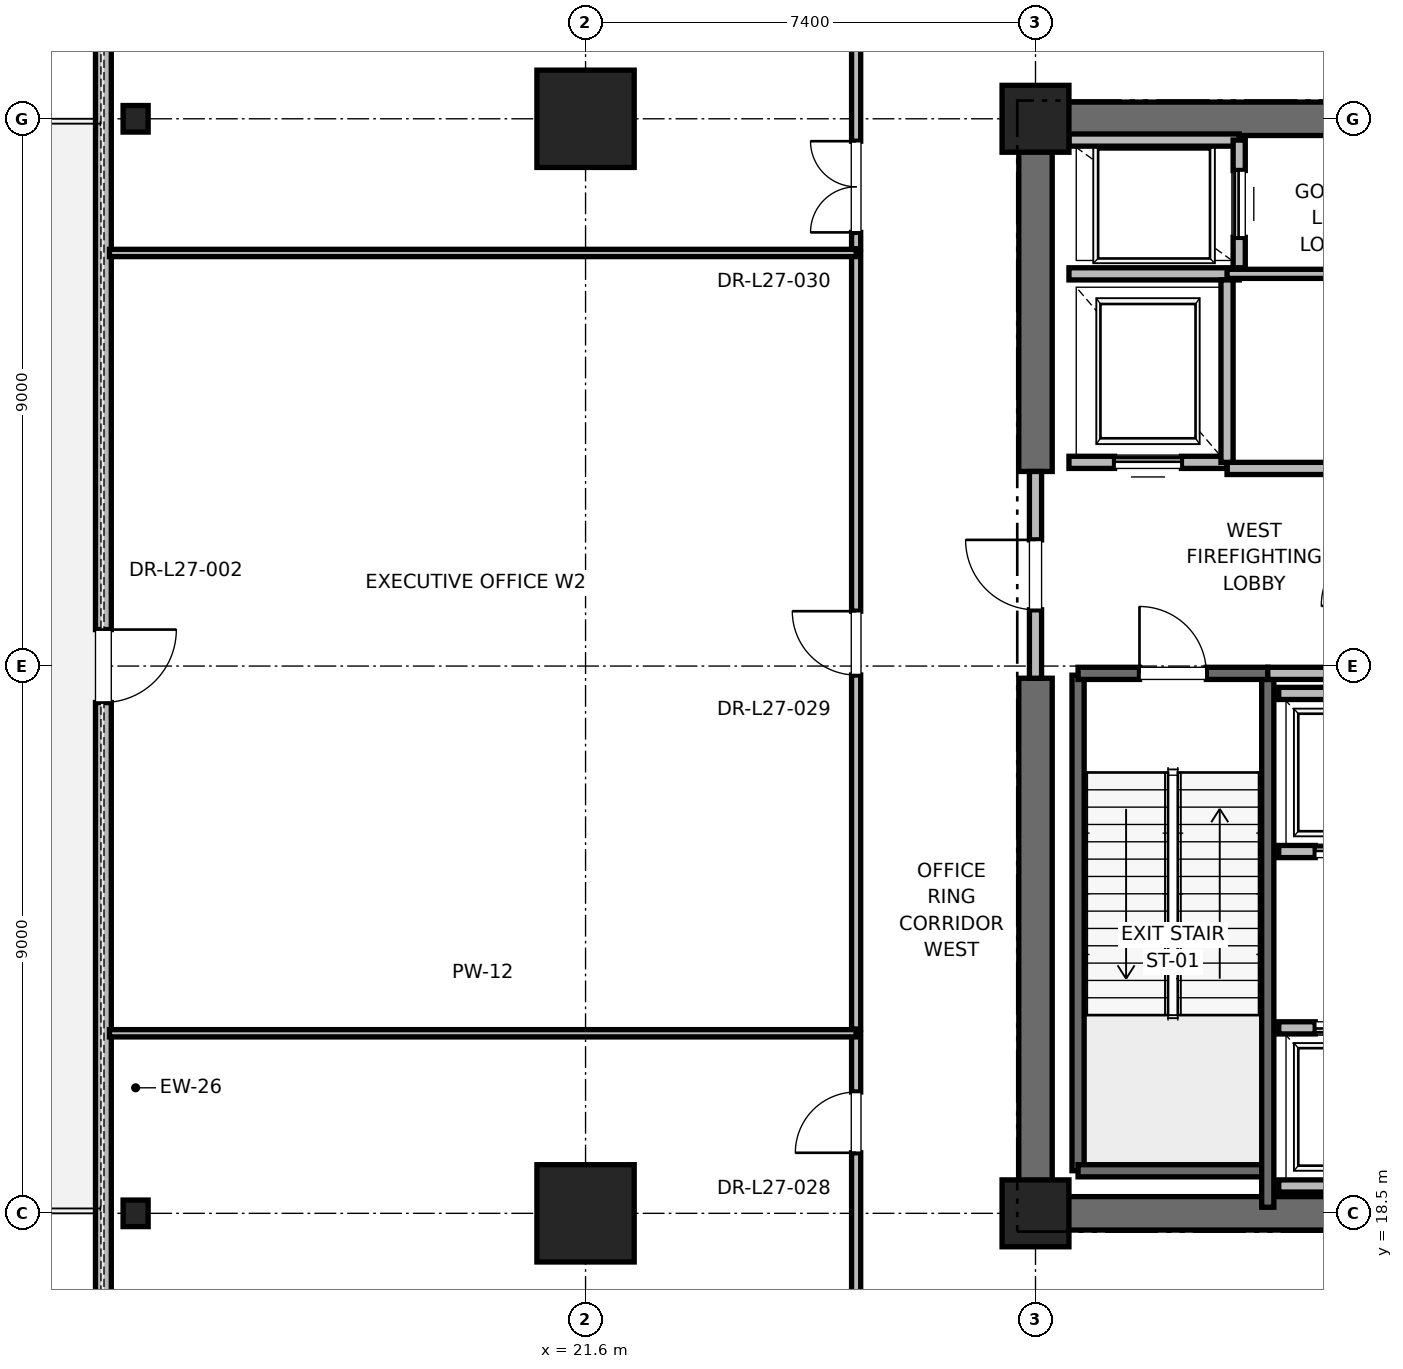
"""IFC4 building model, lengths in metres.
Left out: names, types, materials, properties, quantities, classifications, styles, units other than length and angle.
Written with IfcOpenShell. Run it as: python <this file> out.ifc"""

import sys

from ifc_helpers import new_model, si_unit, direction, frame, frame_2d, origin, origin_2d, place, context, subcontext, project, spatial, rectangle, i_section, extrude, element, fill, save


model = new_model("IFC4")
c1 = context("Model", 3, precision=1e-05, world=origin(), true_north=direction((0.0, 1.0)))
c2 = subcontext(c1, "Body", "Model", "MODEL_VIEW")
j1 = project(units=[si_unit("LENGTHUNIT", "METRE"), si_unit("PLANEANGLEUNIT", "RADIAN")], contexts=[c1])
p1 = place(None, origin())
s1 = spatial("IfcSite", under=j1, at=p1, CompositionType="ELEMENT")
p2 = place(p1, origin())
s2 = spatial("IfcBuilding", under=s1, at=p2, CompositionType="ELEMENT")
p3 = place(p2, frame((0.0, 0.0, 118.4)))
s3 = spatial("IfcBuildingStorey", under=s2, at=p3, CompositionType="ELEMENT", Elevation=118.4)
for number, where, z_axis, x_axis in (
    (1, (21.6, 18.5, 0.0), (0.0, 0.0, 1.0), (1.0, 0.0, 0.0)),
    (2, (21.6, 36.5, 0.0), (0.0, 0.0, 1.0), (1.0, 0.0, 0.0)),
):
    element("IfcColumn", number, at=place(p3, frame(where, z_axis=z_axis, x_axis=x_axis)), inside=s3, PredefinedType="COLUMN", context=c2, shape_type="SweptSolid", body=[
        extrude(rectangle(XDim=1.6, YDim=1.6, at=origin_2d()), origin(), (0.0, 0.0, 1.0), 5.0),
    ])
for number, where, z_axis, x_axis in (
    (3, (14.2, 18.5, 0.0), (0.0, 0.0, 1.0), (1.0, 0.0, 0.0)),
    (4, (14.2, 36.5, 0.0), (0.0, 0.0, 1.0), (1.0, 0.0, 0.0)),
):
    element("IfcColumn", number, at=place(p3, frame(where, z_axis=z_axis, x_axis=x_axis)), inside=s3, PredefinedType="COLUMN", context=c2, shape_type="SweptSolid", body=[
        extrude(i_section(OverallWidth=0.412, OverallDepth=0.437, WebThickness=0.036, FlangeThickness=0.058, FilletRadius=0.015, at=origin_2d()), origin(), (0.0, 0.0, 1.0), 5.0),
    ])
for number, where, z_axis, x_axis in (
    (5, (29.0, 18.5, 0.0), (0.0, 0.0, 1.0), (1.0, 0.0, 0.0)),
    (6, (29.0, 36.5, 0.0), (0.0, 0.0, 1.0), (1.0, 0.0, 0.0)),
):
    element("IfcColumn", number, at=place(p3, frame(where, z_axis=z_axis, x_axis=x_axis)), inside=s3, PredefinedType="PILASTER", context=c2, shape_type="SweptSolid", body=[
        extrude(rectangle(XDim=1.1, YDim=1.1, at=origin_2d()), origin(), (0.0, 0.0, 1.0), 5.0),
    ])
p4 = place(p3, frame((29.0, 18.5, 0.0), z_axis=(0.0, 0.0, 1.0), x_axis=(1.0, 0.0, 0.0)))
e7 = element("IfcWall", 7, at=p4, inside=s3, PredefinedType="SHEAR", context=c2, shape_type="SweptSolid", body=[
    extrude(rectangle(XDim=9.2, YDim=0.55, at=frame_2d((4.6, 0.0))), origin(), (0.0, 0.0, 1.0), 4.7),
])
p5 = place(p3, frame((29.0, 36.5, 0.0), z_axis=(0.0, 0.0, 1.0), x_axis=(1.0, 0.0, 0.0)))
e8 = element("IfcWall", 8, at=p5, inside=s3, PredefinedType="SHEAR", context=c2, shape_type="SweptSolid", body=[
    extrude(rectangle(XDim=5.8, YDim=0.55, at=frame_2d((2.9, 0.0))), origin(), (0.0, 0.0, 1.0), 4.7),
])
p6 = place(p3, frame((29.0, 18.5, 0.0), z_axis=(0.0, 0.0, 1.0), x_axis=(0.0, 1.0, 0.0)))
e9 = element("IfcWall", 9, at=p6, inside=s3, PredefinedType="SHEAR", context=c2, shape_type="SweptSolid", body=[
    extrude(rectangle(XDim=8.8, YDim=0.55, at=frame_2d((4.4, 0.0))), origin(), (0.0, 0.0, 1.0), 4.7),
])
p7 = place(p3, frame((29.0, 30.7, 0.0), z_axis=(0.0, 0.0, 1.0), x_axis=(0.0, 1.0, 0.0)))
e10 = element("IfcWall", 10, at=p7, inside=s3, PredefinedType="SHEAR", context=c2, shape_type="SweptSolid", body=[
    extrude(rectangle(XDim=5.8, YDim=0.55, at=frame_2d((2.9, 0.0))), origin(), (0.0, 0.0, 1.0), 4.7),
])
p8 = place(p3, frame((13.67, 46.771, 0.0), z_axis=(0.0, 0.0, 1.0), x_axis=(0.0, -1.0, 0.0)))
e11 = element("IfcWall", 11, at=p8, inside=s3, PredefinedType="PARAPET", context=c2, shape_type="SweptSolid", body=[
    extrude(rectangle(XDim=38.542, YDim=0.26, at=frame_2d((19.271, 0.0))), origin(), (0.0, 0.0, 1.0), 3.91),
])
p9 = place(p8, frame((4.2, 0.0, 0.85)))
e12 = element("IfcOpeningElement", 12, at=p9, cuts=e11, PredefinedType="OPENING", context=c2, shape_type="SweptSolid", body=[
    extrude(rectangle(XDim=1.8, YDim=2.2, at=frame_2d((0.9, 1.1))), frame((0.0, 0.13, 0.0), z_axis=(0.0, -1.0, 0.0), x_axis=(1.0, 0.0, 0.0)), (0.0, 0.0, 1.0), 0.26),
])
p10 = place(p8, frame((18.671, 0.0, 0.0)))
e13 = element("IfcOpeningElement", 13, at=p10, cuts=e11, PredefinedType="OPENING", context=c2, shape_type="SweptSolid", body=[
    extrude(rectangle(XDim=1.2, YDim=2.2, at=frame_2d((0.6, 1.1))), frame((0.0, 0.13, 0.0), z_axis=(0.0, -1.0, 0.0), x_axis=(1.0, 0.0, 0.0)), (0.0, 0.0, 1.0), 0.26),
])
p11 = place(p8, frame((32.542, 0.0, 0.85)))
e14 = element("IfcOpeningElement", 14, at=p11, cuts=e11, PredefinedType="OPENING", context=c2, shape_type="SweptSolid", body=[
    extrude(rectangle(XDim=1.8, YDim=2.2, at=frame_2d((0.9, 1.1))), frame((0.0, 0.13, 0.0), z_axis=(0.0, -1.0, 0.0), x_axis=(1.0, 0.0, 0.0)), (0.0, 0.0, 1.0), 0.26),
])
p12 = place(p3, frame((29.7, 19.2, 0.0), z_axis=(0.0, 0.0, 1.0), x_axis=(0.0, 1.0, 0.0)))
e15 = element("IfcWall", 15, at=p12, inside=s3, PredefinedType="SOLIDWALL", context=c2, shape_type="SweptSolid", body=[
    extrude(rectangle(XDim=8.15, YDim=0.2, at=frame_2d((4.075, 0.0))), origin(), (0.0, 0.0, 1.0), 4.7),
])
p13 = place(p3, frame((29.7, 19.2, 0.0), z_axis=(0.0, 0.0, 1.0), x_axis=(1.0, 0.0, 0.0)))
e16 = element("IfcWall", 16, at=p13, inside=s3, PredefinedType="SOLIDWALL", context=c2, shape_type="SweptSolid", body=[
    extrude(rectangle(XDim=3.12, YDim=0.2, at=frame_2d((1.56, 0.0))), origin(), (0.0, 0.0, 1.0), 4.7),
])
p14 = place(p3, frame((32.82, 18.6, 0.0), z_axis=(0.0, 0.0, 1.0), x_axis=(0.0, 1.0, 0.0)))
e17 = element("IfcWall", 17, at=p14, inside=s3, PredefinedType="SOLIDWALL", context=c2, shape_type="SweptSolid", body=[
    extrude(rectangle(XDim=8.78, YDim=0.2, at=frame_2d((4.39, 0.0))), origin(), (0.0, 0.0, 1.0), 4.7),
])
p15 = place(p3, frame((29.7, 27.38, 0.0), z_axis=(0.0, 0.0, 1.0), x_axis=(1.0, 0.0, 0.0)))
e18 = element("IfcWall", 18, at=p15, inside=s3, PredefinedType="SOLIDWALL", context=c2, shape_type="SweptSolid", body=[
    extrude(rectangle(XDim=3.12, YDim=0.2, at=frame_2d((1.56, 0.0))), origin(), (0.0, 0.0, 1.0), 4.7),
])
p16 = place(p15, frame((1.01, 0.0, 0.0)))
e19 = element("IfcOpeningElement", 19, at=p16, cuts=e18, PredefinedType="OPENING", context=c2, shape_type="SweptSolid", body=[
    extrude(rectangle(XDim=1.1, YDim=2.15, at=frame_2d((0.55, 1.075))), frame((0.0, 0.1, 0.0), z_axis=(0.0, -1.0, 0.0), x_axis=(1.0, 0.0, 0.0)), (0.0, 0.0, 1.0), 0.2),
])
p17 = place(p3, frame((29.0, 27.3, 0.0), z_axis=(0.0, 0.0, 1.0), x_axis=(0.0, 1.0, 0.0)))
e20 = element("IfcWall", 20, at=p17, inside=s3, PredefinedType="PARTITIONING", context=c2, shape_type="SweptSolid", body=[
    extrude(rectangle(XDim=3.4, YDim=0.2, at=frame_2d((1.7, 0.0))), origin(), (0.0, 0.0, 1.0), 3.68),
])
p18 = place(p17, frame((1.125, 0.0, 0.0)))
e21 = element("IfcOpeningElement", 21, at=p18, cuts=e20, PredefinedType="OPENING", context=c2, shape_type="SweptSolid", body=[
    extrude(rectangle(XDim=1.15, YDim=2.2, at=frame_2d((0.575, 1.1))), frame((0.0, 0.1, 0.0), z_axis=(0.0, -1.0, 0.0), x_axis=(1.0, 0.0, 0.0)), (0.0, 0.0, 1.0), 0.2),
])
p19 = place(p3, frame((32.82, 27.38, 0.0), z_axis=(0.0, 0.0, 1.0), x_axis=(1.0, 0.0, 0.0)))
e22 = element("IfcWall", 22, at=p19, inside=s3, PredefinedType="PARTITIONING", context=c2, shape_type="SweptSolid", body=[
    extrude(rectangle(XDim=5.62, YDim=0.2, at=frame_2d((2.81, 0.0))), origin(), (0.0, 0.0, 1.0), 4.7),
])
p20 = place(p3, frame((32.15, 30.75, 0.0), z_axis=(0.0, 0.0, 1.0), x_axis=(1.0, 0.0, 0.0)))
e23 = element("IfcWall", 23, at=p20, inside=s3, PredefinedType="PARTITIONING", context=c2, shape_type="SweptSolid", body=[
    extrude(rectangle(XDim=3.13, YDim=0.2, at=frame_2d((1.565, 0.0))), origin(), (0.0, 0.0, 1.0), 4.7),
])
p21 = place(p3, frame((29.55, 30.85, 0.0), z_axis=(0.0, 0.0, 1.0), x_axis=(1.0, 0.0, 0.0)))
e24 = element("IfcWall", 24, at=p21, inside=s3, PredefinedType="SOLIDWALL", context=c2, shape_type="SweptSolid", body=[
    extrude(rectangle(XDim=2.6, YDim=0.2, at=frame_2d((1.3, 0.0))), origin(), (0.0, 0.0, 1.0), 3.68),
])
p22 = place(p21, frame((0.75, 0.0, 0.0)))
e25 = element("IfcOpeningElement", 25, at=p22, cuts=e24, PredefinedType="OPENING", context=c2, shape_type="SweptSolid", body=[
    extrude(rectangle(XDim=1.1, YDim=2.2, at=frame_2d((0.55, 1.1))), frame((0.0, 0.1, 0.0), z_axis=(0.0, -1.0, 0.0), x_axis=(1.0, 0.0, 0.0)), (0.0, 0.0, 1.0), 0.2),
])
p23 = place(p3, frame((29.55, 33.95, 0.0), z_axis=(0.0, 0.0, 1.0), x_axis=(1.0, 0.0, 0.0)))
e26 = element("IfcWall", 26, at=p23, inside=s3, PredefinedType="SOLIDWALL", context=c2, shape_type="SweptSolid", body=[
    extrude(rectangle(XDim=2.8, YDim=0.2, at=frame_2d((1.4, 0.0))), origin(), (0.0, 0.0, 1.0), 4.7),
])
p24 = place(p3, frame((32.15, 30.85, 0.0), z_axis=(0.0, 0.0, 1.0), x_axis=(0.0, 1.0, 0.0)))
e27 = element("IfcWall", 27, at=p24, inside=s3, PredefinedType="SOLIDWALL", context=c2, shape_type="SweptSolid", body=[
    extrude(rectangle(XDim=3.0, YDim=0.2, at=frame_2d((1.5, 0.0))), origin(), (0.0, 0.0, 1.0), 4.7),
])
p25 = place(p3, frame((32.35, 36.15, 0.0), z_axis=(0.0, 0.0, 1.0), x_axis=(-1.0, 0.0, 0.0)))
e28 = element("IfcWall", 28, at=p25, inside=s3, PredefinedType="SOLIDWALL", context=c2, shape_type="SweptSolid", body=[
    extrude(rectangle(XDim=2.8, YDim=0.2, at=frame_2d((1.4, 0.0))), origin(), (0.0, 0.0, 1.0), 3.91),
])
p26 = place(p3, frame((32.35, 34.05, 0.0), z_axis=(0.0, 0.0, 1.0), x_axis=(0.0, 1.0, 0.0)))
e29 = element("IfcWall", 29, at=p26, inside=s3, PredefinedType="SOLIDWALL", context=c2, shape_type="SweptSolid", body=[
    extrude(rectangle(XDim=2.1, YDim=0.2, at=frame_2d((1.05, 0.0))), origin(), (0.0, 0.0, 1.0), 4.7),
])
p27 = place(p26, frame((0.5, 0.0, 0.0)))
e30 = element("IfcOpeningElement", 30, at=p27, cuts=e29, PredefinedType="OPENING", context=c2, shape_type="SweptSolid", body=[
    extrude(rectangle(XDim=1.1, YDim=2.2, at=frame_2d((0.55, 1.1))), frame((0.0, 0.1, 0.0), z_axis=(0.0, -1.0, 0.0), x_axis=(1.0, 0.0, 0.0)), (0.0, 0.0, 1.0), 0.2),
])
p28 = place(p3, frame((33.0, 18.95, 0.0), z_axis=(0.0, 0.0, 1.0), x_axis=(1.0, 0.0, 0.0)))
e31 = element("IfcWall", 31, at=p28, inside=s3, PredefinedType="SOLIDWALL", context=c2, shape_type="SweptSolid", body=[
    extrude(rectangle(XDim=2.3, YDim=0.2, at=frame_2d((1.15, 0.0))), origin(), (0.0, 0.0, 1.0), 4.7),
])
p29 = place(p3, frame((35.3, 21.55, 0.0), z_axis=(0.0, 0.0, 1.0), x_axis=(-1.0, 0.0, 0.0)))
e32 = element("IfcWall", 32, at=p29, inside=s3, PredefinedType="SOLIDWALL", context=c2, shape_type="SweptSolid", body=[
    extrude(rectangle(XDim=2.3, YDim=0.2, at=frame_2d((1.15, 0.0))), origin(), (0.0, 0.0, 1.0), 4.7),
])
p30 = place(p29, frame((0.6, 0.0, 0.0)))
e33 = element("IfcOpeningElement", 33, at=p30, cuts=e32, PredefinedType="OPENING", context=c2, shape_type="SweptSolid", body=[
    extrude(rectangle(XDim=1.1, YDim=2.2, at=frame_2d((0.55, 1.1))), frame((0.0, 0.1, 0.0), z_axis=(0.0, -1.0, 0.0), x_axis=(1.0, 0.0, 0.0)), (0.0, 0.0, 1.0), 0.2),
])
p31 = place(p3, frame((33.0, 24.45, 0.0), z_axis=(0.0, 0.0, 1.0), x_axis=(1.0, 0.0, 0.0)))
e34 = element("IfcWall", 34, at=p31, inside=s3, PredefinedType="SOLIDWALL", context=c2, shape_type="SweptSolid", body=[
    extrude(rectangle(XDim=2.3, YDim=0.2, at=frame_2d((1.15, 0.0))), origin(), (0.0, 0.0, 1.0), 4.7),
])
p32 = place(p31, frame((0.6, 0.0, 0.0)))
e35 = element("IfcOpeningElement", 35, at=p32, cuts=e34, PredefinedType="OPENING", context=c2, shape_type="SweptSolid", body=[
    extrude(rectangle(XDim=1.1, YDim=2.2, at=frame_2d((0.55, 1.1))), frame((0.0, 0.1, 0.0), z_axis=(0.0, -1.0, 0.0), x_axis=(1.0, 0.0, 0.0)), (0.0, 0.0, 1.0), 0.2),
])
p33 = place(p3, frame((35.3, 27.05, 0.0), z_axis=(0.0, 0.0, 1.0), x_axis=(-1.0, 0.0, 0.0)))
e36 = element("IfcWall", 36, at=p33, inside=s3, PredefinedType="SOLIDWALL", context=c2, shape_type="SweptSolid", body=[
    extrude(rectangle(XDim=2.3, YDim=0.2, at=frame_2d((1.15, 0.0))), origin(), (0.0, 0.0, 1.0), 4.7),
])
p34 = place(p3, frame((32.15, 33.95, 0.0), z_axis=(0.0, 0.0, 1.0), x_axis=(1.0, 0.0, 0.0)))
e37 = element("IfcWall", 37, at=p34, inside=s3, PredefinedType="PARTITIONING", context=c2, shape_type="SweptSolid", body=[
    extrude(rectangle(XDim=3.13, YDim=0.15, at=frame_2d((1.565, 0.0))), origin(), (0.0, 0.0, 1.0), 2.85),
])
p35 = place(p3, frame((26.05, 8.629, 0.0), z_axis=(0.0, 0.0, 1.0), x_axis=(0.0, 1.0, 0.0)))
e38 = element("IfcWall", 38, at=p35, inside=s3, PredefinedType="PARTITIONING", context=c2, shape_type="SweptSolid", body=[
    extrude(rectangle(XDim=12.832, YDim=0.15, at=frame_2d((6.416, 0.0))), origin(), (0.0, 0.0, 1.0), 2.85),
])
p36 = place(p35, frame((10.867, 0.0, 0.0)))
e39 = element("IfcOpeningElement", 39, at=p36, cuts=e38, PredefinedType="OPENING", context=c2, shape_type="SweptSolid", body=[
    extrude(rectangle(XDim=1.0, YDim=2.15, at=frame_2d((0.5, 1.075))), frame((0.0, 0.075, 0.0), z_axis=(0.0, -1.0, 0.0), x_axis=(1.0, 0.0, 0.0)), (0.0, 0.0, 1.0), 0.15),
])
p37 = place(p3, frame((13.77, 21.461, 0.0), z_axis=(0.0, 0.0, 1.0), x_axis=(1.0, 0.0, 0.0)))
e40 = element("IfcWall", 40, at=p37, inside=s3, PredefinedType="PARTITIONING", context=c2, shape_type="SweptSolid", body=[
    extrude(rectangle(XDim=12.28, YDim=0.12, at=frame_2d((6.14, 0.0))), origin(), (0.0, 0.0, 1.0), 2.85),
])
p38 = place(p3, frame((26.05, 21.531, 0.0), z_axis=(0.0, 0.0, 1.0), x_axis=(0.0, 1.0, 0.0)))
e41 = element("IfcWall", 41, at=p38, inside=s3, PredefinedType="PARTITIONING", context=c2, shape_type="SweptSolid", body=[
    extrude(rectangle(XDim=12.762, YDim=0.15, at=frame_2d((6.381, 0.0))), origin(), (0.0, 0.0, 1.0), 2.85),
])
p39 = place(p38, frame((5.821, 0.0, 0.0)))
e42 = element("IfcOpeningElement", 42, at=p39, cuts=e41, PredefinedType="OPENING", context=c2, shape_type="SweptSolid", body=[
    extrude(rectangle(XDim=1.05, YDim=2.2, at=frame_2d((0.525, 1.1))), frame((0.0, 0.075, 0.0), z_axis=(0.0, -1.0, 0.0), x_axis=(1.0, 0.0, 0.0)), (0.0, 0.0, 1.0), 0.15),
])
p40 = place(p3, frame((13.77, 34.293, 0.0), z_axis=(0.0, 0.0, 1.0), x_axis=(1.0, 0.0, 0.0)))
e43 = element("IfcWall", 43, at=p40, inside=s3, PredefinedType="PARTITIONING", context=c2, shape_type="SweptSolid", body=[
    extrude(rectangle(XDim=12.28, YDim=0.12, at=frame_2d((6.14, 0.0))), origin(), (0.0, 0.0, 1.0), 2.85),
])
p41 = place(p3, frame((26.05, 34.364, 0.0), z_axis=(0.0, 0.0, 1.0), x_axis=(0.0, 1.0, 0.0)))
e44 = element("IfcWall", 44, at=p41, inside=s3, PredefinedType="PARTITIONING", context=c2, shape_type="SweptSolid", body=[
    extrude(rectangle(XDim=12.007, YDim=0.15, at=frame_2d((6.004, 0.0))), origin(), (0.0, 0.0, 1.0), 2.85),
])
p42 = place(p41, frame((0.268, 0.0, 0.0)))
e45 = element("IfcOpeningElement", 45, at=p42, cuts=e44, PredefinedType="OPENING", context=c2, shape_type="SweptSolid", body=[
    extrude(rectangle(XDim=1.5, YDim=2.25, at=frame_2d((0.75, 1.125))), frame((0.0, 0.075, 0.0), z_axis=(0.0, -1.0, 0.0), x_axis=(1.0, 0.0, 0.0)), (0.0, 0.0, 1.0), 0.15),
])
p43 = place(p10, origin())
e46 = element("IfcDoor", 46, at=p43, inside=s3, OperationType="SINGLE_SWING_LEFT", PredefinedType="DOOR", context=c2, shape_type="SweptSolid", body=[
    extrude(rectangle(XDim=1.2, YDim=2.2, at=frame_2d((0.6, 1.1))), frame((0.0, 0.025, 0.0), z_axis=(0.0, -1.0, 0.0), x_axis=(1.0, 0.0, 0.0)), (0.0, 0.0, 1.0), 0.05),
])
fill(e13, e46)
p44 = place(p16, origin())
e47 = element("IfcDoor", 47, at=p44, inside=s3, OperationType="SINGLE_SWING_LEFT", PredefinedType="DOOR", context=c2, shape_type="SweptSolid", body=[
    extrude(rectangle(XDim=1.1, YDim=2.15, at=frame_2d((0.55, 1.075))), frame((0.0, 0.025, 0.0), z_axis=(0.0, -1.0, 0.0), x_axis=(1.0, 0.0, 0.0)), (0.0, 0.0, 1.0), 0.05),
])
fill(e19, e47)
p45 = place(p18, origin())
e48 = element("IfcDoor", 48, at=p45, inside=s3, OperationType="SINGLE_SWING_RIGHT", PredefinedType="DOOR", context=c2, shape_type="SweptSolid", body=[
    extrude(rectangle(XDim=1.15, YDim=2.2, at=frame_2d((0.575, 1.1))), frame((0.0, 0.025, 0.0), z_axis=(0.0, -1.0, 0.0), x_axis=(1.0, 0.0, 0.0)), (0.0, 0.0, 1.0), 0.05),
])
fill(e21, e48)
p46 = place(p22, origin())
e49 = element("IfcDoor", 49, at=p46, inside=s3, OperationType="SLIDING_TO_RIGHT", PredefinedType="DOOR", context=c2, shape_type="SweptSolid", body=[
    extrude(rectangle(XDim=1.1, YDim=2.2, at=frame_2d((0.55, 1.1))), frame((0.0, 0.025, 0.0), z_axis=(0.0, -1.0, 0.0), x_axis=(1.0, 0.0, 0.0)), (0.0, 0.0, 1.0), 0.05),
])
fill(e25, e49)
p47 = place(p27, origin())
e50 = element("IfcDoor", 50, at=p47, inside=s3, OperationType="SLIDING_TO_RIGHT", PredefinedType="DOOR", context=c2, shape_type="SweptSolid", body=[
    extrude(rectangle(XDim=1.1, YDim=2.2, at=frame_2d((0.55, 1.1))), frame((0.0, 0.025, 0.0), z_axis=(0.0, -1.0, 0.0), x_axis=(1.0, 0.0, 0.0)), (0.0, 0.0, 1.0), 0.05),
])
fill(e30, e50)
p48 = place(p30, origin())
e51 = element("IfcDoor", 51, at=p48, inside=s3, OperationType="SLIDING_TO_RIGHT", PredefinedType="DOOR", context=c2, shape_type="SweptSolid", body=[
    extrude(rectangle(XDim=1.1, YDim=2.2, at=frame_2d((0.55, 1.1))), frame((0.0, 0.025, 0.0), z_axis=(0.0, -1.0, 0.0), x_axis=(1.0, 0.0, 0.0)), (0.0, 0.0, 1.0), 0.05),
])
fill(e33, e51)
p49 = place(p32, origin())
e52 = element("IfcDoor", 52, at=p49, inside=s3, OperationType="SLIDING_TO_RIGHT", PredefinedType="DOOR", context=c2, shape_type="SweptSolid", body=[
    extrude(rectangle(XDim=1.1, YDim=2.2, at=frame_2d((0.55, 1.1))), frame((0.0, 0.025, 0.0), z_axis=(0.0, -1.0, 0.0), x_axis=(1.0, 0.0, 0.0)), (0.0, 0.0, 1.0), 0.05),
])
fill(e35, e52)
p50 = place(p36, origin())
e53 = element("IfcDoor", 53, at=p50, inside=s3, OperationType="SINGLE_SWING_LEFT", PredefinedType="DOOR", context=c2, shape_type="SweptSolid", body=[
    extrude(rectangle(XDim=1.0, YDim=2.15, at=frame_2d((0.5, 1.075))), frame((0.0, 0.025, 0.0), z_axis=(0.0, -1.0, 0.0), x_axis=(1.0, 0.0, 0.0)), (0.0, 0.0, 1.0), 0.05),
])
fill(e39, e53)
p51 = place(p39, origin())
e54 = element("IfcDoor", 54, at=p51, inside=s3, OperationType="SINGLE_SWING_RIGHT", PredefinedType="DOOR", context=c2, shape_type="SweptSolid", body=[
    extrude(rectangle(XDim=1.05, YDim=2.2, at=frame_2d((0.525, 1.1))), frame((0.0, 0.025, 0.0), z_axis=(0.0, -1.0, 0.0), x_axis=(1.0, 0.0, 0.0)), (0.0, 0.0, 1.0), 0.05),
])
fill(e42, e54)
p52 = place(p42, origin())
e55 = element("IfcDoor", 55, at=p52, inside=s3, OperationType="DOUBLE_DOOR_SINGLE_SWING", PredefinedType="DOOR", context=c2, shape_type="SweptSolid", body=[
    extrude(rectangle(XDim=1.5, YDim=2.25, at=frame_2d((0.75, 1.125))), frame((0.0, 0.025, 0.0), z_axis=(0.0, -1.0, 0.0), x_axis=(1.0, 0.0, 0.0)), (0.0, 0.0, 1.0), 0.05),
])
fill(e45, e55)
save(model, sys.argv[1])
